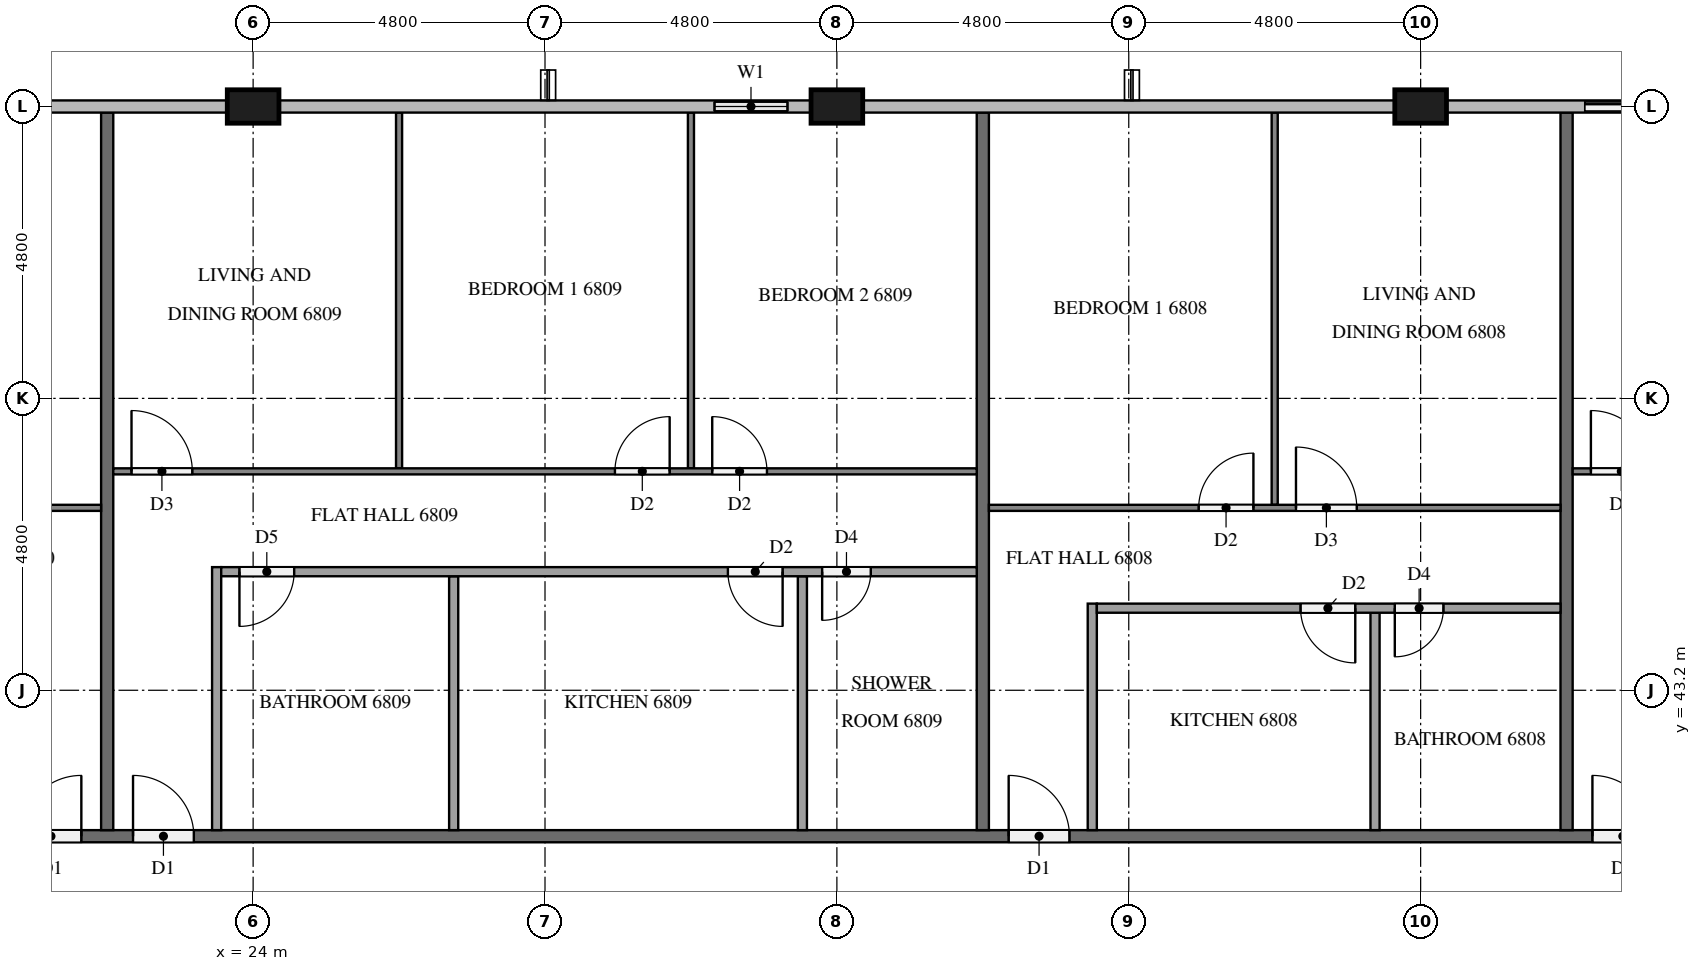
"""IFC4 building model, lengths in metres.
Left out: names, types, materials, properties, quantities, classifications, styles, units other than length and angle.
Written with IfcOpenShell. Run it as: python <this file> out.ifc"""

import sys

from ifc_helpers import new_model, si_unit, direction, frame, frame_2d, origin, origin_2d, place, context, subcontext, project, spatial, rectangle, extrude, element, fill, save


model = new_model("IFC4")
c1 = context("Model", 3, precision=1e-05, world=origin(), true_north=direction((0.0, 1.0)))
c2 = subcontext(c1, "Body", "Model", "MODEL_VIEW")
j1 = project(units=[si_unit("LENGTHUNIT", "METRE"), si_unit("PLANEANGLEUNIT", "RADIAN")], contexts=[c1])
p1 = place(None, origin())
s1 = spatial("IfcSite", under=j1, at=p1, CompositionType="ELEMENT")
p2 = place(p1, origin())
s2 = spatial("IfcBuilding", under=s1, at=p2, CompositionType="ELEMENT")
p3 = place(p2, frame((0.0, 0.0, 259.7)))
s3 = spatial("IfcBuildingStorey", under=s2, at=p3, CompositionType="ELEMENT", Elevation=259.7)
for number, where, z_axis, x_axis in (
    (1, (43.2, 52.8, 0.0), (0.0, 0.0, 1.0), (1.0, 0.0, 0.0)),
    (2, (33.6, 52.8, 0.0), (0.0, 0.0, 1.0), (1.0, 0.0, 0.0)),
    (3, (24.0, 52.8, 0.0), (0.0, 0.0, 1.0), (1.0, 0.0, 0.0)),
):
    element("IfcColumn", number, at=place(p3, frame(where, z_axis=z_axis, x_axis=x_axis)), inside=s3, PredefinedType="COLUMN", context=c2, shape_type="SweptSolid", body=[
        extrude(rectangle(XDim=0.85, YDim=0.55, at=origin_2d()), origin(), (0.0, 0.0, 1.0), 3.1),
    ])
p4 = place(p3, frame((48.0, 52.8, 0.0), z_axis=(0.0, 0.0, 1.0), x_axis=(-1.0, 0.0, 0.0)))
e4 = element("IfcWall", 4, at=p4, inside=s3, PredefinedType="SOLIDWALL", context=c2, shape_type="SweptSolid", body=[
    extrude(rectangle(XDim=2.4, YDim=0.15, at=frame_2d((1.2, 0.0))), origin(), (0.0, 0.0, 1.0), 3.1),
])
p5 = place(p4, frame((0.3, 0.0, 0.0)))
e5 = element("IfcOpeningElement", 5, at=p5, cuts=e4, PredefinedType="OPENING", context=c2, shape_type="SweptSolid", body=[
    extrude(rectangle(XDim=1.8, YDim=2.4, at=frame_2d((0.9, 1.2))), frame((0.0, 0.085, 0.0), z_axis=(0.0, -1.0, 0.0), x_axis=(1.0, 0.0, 0.0)), (0.0, 0.0, 1.0), 0.17),
])
p6 = place(p3, frame((33.175, 52.8, 0.0), z_axis=(0.0, 0.0, 1.0), x_axis=(-1.0, 0.0, 0.0)))
e6 = element("IfcWall", 6, at=p6, inside=s3, PredefinedType="SOLIDWALL", context=c2, shape_type="SweptSolid", body=[
    extrude(rectangle(XDim=1.975, YDim=0.15, at=frame_2d((0.988, 0.0))), origin(), (0.0, 0.0, 1.0), 3.1),
])
p7 = place(p6, frame((0.387, 0.0, 0.9)))
e7 = element("IfcOpeningElement", 7, at=p7, cuts=e6, PredefinedType="OPENING", context=c2, shape_type="SweptSolid", body=[
    extrude(rectangle(XDim=1.2, YDim=1.4, at=frame_2d((0.6, 0.7))), frame((0.0, 0.085, 0.0), z_axis=(0.0, -1.0, 0.0), x_axis=(1.0, 0.0, 0.0)), (0.0, 0.0, 1.0), 0.17),
])
p8 = place(p3, frame((11.9, 40.8, 0.0), z_axis=(0.0, 0.0, 1.0), x_axis=(1.0, 0.0, 0.0)))
e8 = element("IfcWall", 8, at=p8, inside=s3, PredefinedType="PARTITIONING", context=c2, shape_type="SweptSolid", body=[
    extrude(rectangle(XDim=38.6, YDim=0.2, at=frame_2d((19.3, 0.0))), origin(), (0.0, 0.0, 1.0), 3.1),
])
p9 = place(p8, frame((34.125, 0.0, 0.0)))
e9 = element("IfcOpeningElement", 9, at=p9, cuts=e8, PredefinedType="OPENING", context=c2, shape_type="SweptSolid", body=[
    extrude(rectangle(XDim=1.0, YDim=2.1, at=frame_2d((0.5, 1.05))), frame((0.0, 0.11, 0.0), z_axis=(0.0, -1.0, 0.0), x_axis=(1.0, 0.0, 0.0)), (0.0, 0.0, 1.0), 0.22),
])
p10 = place(p8, frame((24.525, 0.0, 0.0)))
e10 = element("IfcOpeningElement", 10, at=p10, cuts=e8, PredefinedType="OPENING", context=c2, shape_type="SweptSolid", body=[
    extrude(rectangle(XDim=1.0, YDim=2.1, at=frame_2d((0.5, 1.05))), frame((0.0, 0.11, 0.0), z_axis=(0.0, -1.0, 0.0), x_axis=(1.0, 0.0, 0.0)), (0.0, 0.0, 1.0), 0.22),
])
p11 = place(p8, frame((10.125, 0.0, 0.0)))
e11 = element("IfcOpeningElement", 11, at=p11, cuts=e8, PredefinedType="OPENING", context=c2, shape_type="SweptSolid", body=[
    extrude(rectangle(XDim=1.0, YDim=2.1, at=frame_2d((0.5, 1.05))), frame((0.0, 0.11, 0.0), z_axis=(0.0, -1.0, 0.0), x_axis=(1.0, 0.0, 0.0)), (0.0, 0.0, 1.0), 0.22),
])
p12 = place(p8, frame((8.275, 0.0, 0.0)))
e12 = element("IfcOpeningElement", 12, at=p12, cuts=e8, PredefinedType="OPENING", context=c2, shape_type="SweptSolid", body=[
    extrude(rectangle(XDim=1.0, YDim=2.1, at=frame_2d((0.5, 1.05))), frame((0.0, 0.11, 0.0), z_axis=(0.0, -1.0, 0.0), x_axis=(1.0, 0.0, 0.0)), (0.0, 0.0, 1.0), 0.22),
])
for number, where, z_axis, x_axis in (
    (13, (45.6, 52.7, 0.0), (0.0, 0.0, 1.0), (0.0, -1.0, 0.0)),
    (14, (36.0, 52.7, 0.0), (0.0, 0.0, 1.0), (0.0, -1.0, 0.0)),
    (15, (21.6, 52.7, 0.0), (0.0, 0.0, 1.0), (0.0, -1.0, 0.0)),
):
    element("IfcWall", number, at=place(p3, frame(where, z_axis=z_axis, x_axis=x_axis)), inside=s3, PredefinedType="PARTITIONING", context=c2, shape_type="SweptSolid", body=[
        extrude(rectangle(XDim=11.8, YDim=0.2, at=frame_2d((5.9, 0.0))), origin(), (0.0, 0.0, 1.0), 3.1),
    ])
p13 = place(p3, frame((45.7, 46.8, 0.0), z_axis=(0.0, 0.0, 1.0), x_axis=(1.0, 0.0, 0.0)))
e16 = element("IfcWall", 16, at=p13, inside=s3, PredefinedType="PARTITIONING", context=c2, shape_type="SweptSolid", body=[
    extrude(rectangle(XDim=11.8, YDim=0.1, at=frame_2d((5.9, 0.0))), origin(), (0.0, 0.0, 1.0), 3.1),
])
p14 = place(p13, frame((0.3, 0.0, 0.0)))
e17 = element("IfcOpeningElement", 17, at=p14, cuts=e16, PredefinedType="OPENING", context=c2, shape_type="SweptSolid", body=[
    extrude(rectangle(XDim=1.0, YDim=2.1, at=frame_2d((0.5, 1.05))), frame((0.0, 0.06, 0.0), z_axis=(0.0, -1.0, 0.0), x_axis=(1.0, 0.0, 0.0)), (0.0, 0.0, 1.0), 0.12),
])
p15 = place(p13, frame((10.6, 0.0, 0.0)))
e18 = element("IfcOpeningElement", 18, at=p15, cuts=e16, PredefinedType="OPENING", context=c2, shape_type="SweptSolid", body=[
    extrude(rectangle(XDim=0.9, YDim=2.1, at=frame_2d((0.45, 1.05))), frame((0.0, 0.06, 0.0), z_axis=(0.0, -1.0, 0.0), x_axis=(1.0, 0.0, 0.0)), (0.0, 0.0, 1.0), 0.12),
])
p16 = place(p3, frame((40.8, 46.25, 0.0), z_axis=(0.0, 0.0, 1.0), x_axis=(0.0, 1.0, 0.0)))
e19 = element("IfcWall", 19, at=p16, inside=s3, PredefinedType="PARTITIONING", context=c2, shape_type="SweptSolid", body=[
    extrude(rectangle(XDim=6.45, YDim=0.1, at=frame_2d((3.225, 0.0))), origin(), (0.0, 0.0, 1.0), 3.1),
])
p17 = place(p3, frame((36.1, 46.2, 0.0), z_axis=(0.0, 0.0, 1.0), x_axis=(1.0, 0.0, 0.0)))
e20 = element("IfcWall", 20, at=p17, inside=s3, PredefinedType="PARTITIONING", context=c2, shape_type="SweptSolid", body=[
    extrude(rectangle(XDim=9.4, YDim=0.1, at=frame_2d((4.7, 0.0))), origin(), (0.0, 0.0, 1.0), 3.1),
])
p18 = place(p17, frame((3.45, 0.0, 0.0)))
e21 = element("IfcOpeningElement", 21, at=p18, cuts=e20, PredefinedType="OPENING", context=c2, shape_type="SweptSolid", body=[
    extrude(rectangle(XDim=0.9, YDim=2.1, at=frame_2d((0.45, 1.05))), frame((0.0, 0.06, 0.0), z_axis=(0.0, -1.0, 0.0), x_axis=(1.0, 0.0, 0.0)), (0.0, 0.0, 1.0), 0.12),
])
p19 = place(p17, frame((5.05, 0.0, 0.0)))
e22 = element("IfcOpeningElement", 22, at=p19, cuts=e20, PredefinedType="OPENING", context=c2, shape_type="SweptSolid", body=[
    extrude(rectangle(XDim=1.0, YDim=2.1, at=frame_2d((0.5, 1.05))), frame((0.0, 0.06, 0.0), z_axis=(0.0, -1.0, 0.0), x_axis=(1.0, 0.0, 0.0)), (0.0, 0.0, 1.0), 0.12),
])
p20 = place(p3, frame((42.45, 40.9, 0.0), z_axis=(0.0, 0.0, 1.0), x_axis=(0.0, 1.0, 0.0)))
e23 = element("IfcWall", 23, at=p20, inside=s3, PredefinedType="PARTITIONING", context=c2, shape_type="SweptSolid", body=[
    extrude(rectangle(XDim=3.575, YDim=0.15, at=frame_2d((1.788, 0.0))), origin(), (0.0, 0.0, 1.0), 3.1),
])
p21 = place(p3, frame((37.8, 40.9, 0.0), z_axis=(0.0, 0.0, 1.0), x_axis=(0.0, 1.0, 0.0)))
e24 = element("IfcWall", 24, at=p21, inside=s3, PredefinedType="PARTITIONING", context=c2, shape_type="SweptSolid", body=[
    extrude(rectangle(XDim=3.725, YDim=0.15, at=frame_2d((1.863, 0.0))), origin(), (0.0, 0.0, 1.0), 3.1),
])
p22 = place(p3, frame((45.5, 44.55, 0.0), z_axis=(0.0, 0.0, 1.0), x_axis=(-1.0, 0.0, 0.0)))
e25 = element("IfcWall", 25, at=p22, inside=s3, PredefinedType="PARTITIONING", context=c2, shape_type="SweptSolid", body=[
    extrude(rectangle(XDim=7.625, YDim=0.15, at=frame_2d((3.812, 0.0))), origin(), (0.0, 0.0, 1.0), 3.1),
])
p23 = place(p22, frame((3.375, 0.0, 0.0)))
e26 = element("IfcOpeningElement", 26, at=p23, cuts=e25, PredefinedType="OPENING", context=c2, shape_type="SweptSolid", body=[
    extrude(rectangle(XDim=0.9, YDim=2.1, at=frame_2d((0.45, 1.05))), frame((0.0, 0.085, 0.0), z_axis=(0.0, -1.0, 0.0), x_axis=(1.0, 0.0, 0.0)), (0.0, 0.0, 1.0), 0.17),
])
p24 = place(p22, frame((1.925, 0.0, 0.0)))
e27 = element("IfcOpeningElement", 27, at=p24, cuts=e25, PredefinedType="OPENING", context=c2, shape_type="SweptSolid", body=[
    extrude(rectangle(XDim=0.8, YDim=2.1, at=frame_2d((0.4, 1.05))), frame((0.0, 0.085, 0.0), z_axis=(0.0, -1.0, 0.0), x_axis=(1.0, 0.0, 0.0)), (0.0, 0.0, 1.0), 0.17),
])
for number, where, z_axis, x_axis in (
    (28, (26.4, 46.85, 0.0), (0.0, 0.0, 1.0), (0.0, 1.0, 0.0)),
    (29, (31.2, 46.85, 0.0), (0.0, 0.0, 1.0), (0.0, 1.0, 0.0)),
):
    element("IfcWall", number, at=place(p3, frame(where, z_axis=z_axis, x_axis=x_axis)), inside=s3, PredefinedType="PARTITIONING", context=c2, shape_type="SweptSolid", body=[
        extrude(rectangle(XDim=5.85, YDim=0.1, at=frame_2d((2.925, 0.0))), origin(), (0.0, 0.0, 1.0), 3.1),
    ])
p25 = place(p3, frame((21.7, 46.8, 0.0), z_axis=(0.0, 0.0, 1.0), x_axis=(1.0, 0.0, 0.0)))
e30 = element("IfcWall", 30, at=p25, inside=s3, PredefinedType="PARTITIONING", context=c2, shape_type="SweptSolid", body=[
    extrude(rectangle(XDim=14.2, YDim=0.1, at=frame_2d((7.1, 0.0))), origin(), (0.0, 0.0, 1.0), 3.1),
])
p26 = place(p25, frame((0.3, 0.0, 0.0)))
e31 = element("IfcOpeningElement", 31, at=p26, cuts=e30, PredefinedType="OPENING", context=c2, shape_type="SweptSolid", body=[
    extrude(rectangle(XDim=1.0, YDim=2.1, at=frame_2d((0.5, 1.05))), frame((0.0, 0.06, 0.0), z_axis=(0.0, -1.0, 0.0), x_axis=(1.0, 0.0, 0.0)), (0.0, 0.0, 1.0), 0.12),
])
p27 = place(p25, frame((8.25, 0.0, 0.0)))
e32 = element("IfcOpeningElement", 32, at=p27, cuts=e30, PredefinedType="OPENING", context=c2, shape_type="SweptSolid", body=[
    extrude(rectangle(XDim=0.9, YDim=2.1, at=frame_2d((0.45, 1.05))), frame((0.0, 0.06, 0.0), z_axis=(0.0, -1.0, 0.0), x_axis=(1.0, 0.0, 0.0)), (0.0, 0.0, 1.0), 0.12),
])
p28 = place(p25, frame((9.85, 0.0, 0.0)))
e33 = element("IfcOpeningElement", 33, at=p28, cuts=e30, PredefinedType="OPENING", context=c2, shape_type="SweptSolid", body=[
    extrude(rectangle(XDim=0.9, YDim=2.1, at=frame_2d((0.45, 1.05))), frame((0.0, 0.06, 0.0), z_axis=(0.0, -1.0, 0.0), x_axis=(1.0, 0.0, 0.0)), (0.0, 0.0, 1.0), 0.12),
])
for number, where, z_axis, x_axis in (
    (34, (27.298, 40.9, 0.0), (0.0, 0.0, 1.0), (0.0, 1.0, 0.0)),
    (35, (33.033, 40.9, 0.0), (0.0, 0.0, 1.0), (0.0, 1.0, 0.0)),
):
    element("IfcWall", number, at=place(p3, frame(where, z_axis=z_axis, x_axis=x_axis)), inside=s3, PredefinedType="PARTITIONING", context=c2, shape_type="SweptSolid", body=[
        extrude(rectangle(XDim=4.175, YDim=0.15, at=frame_2d((2.087, 0.0))), origin(), (0.0, 0.0, 1.0), 3.1),
    ])
p29 = place(p3, frame((23.4, 40.9, 0.0), z_axis=(0.0, 0.0, 1.0), x_axis=(0.0, 1.0, 0.0)))
e36 = element("IfcWall", 36, at=p29, inside=s3, PredefinedType="PARTITIONING", context=c2, shape_type="SweptSolid", body=[
    extrude(rectangle(XDim=4.325, YDim=0.15, at=frame_2d((2.163, 0.0))), origin(), (0.0, 0.0, 1.0), 3.1),
])
p30 = place(p3, frame((35.9, 45.15, 0.0), z_axis=(0.0, 0.0, 1.0), x_axis=(-1.0, 0.0, 0.0)))
e37 = element("IfcWall", 37, at=p30, inside=s3, PredefinedType="PARTITIONING", context=c2, shape_type="SweptSolid", body=[
    extrude(rectangle(XDim=12.425, YDim=0.15, at=frame_2d((6.212, 0.0))), origin(), (0.0, 0.0, 1.0), 3.1),
])
p31 = place(p30, frame((11.225, 0.0, 0.0)))
e38 = element("IfcOpeningElement", 38, at=p31, cuts=e37, PredefinedType="OPENING", context=c2, shape_type="SweptSolid", body=[
    extrude(rectangle(XDim=0.9, YDim=2.1, at=frame_2d((0.45, 1.05))), frame((0.0, 0.085, 0.0), z_axis=(0.0, -1.0, 0.0), x_axis=(1.0, 0.0, 0.0)), (0.0, 0.0, 1.0), 0.17),
])
p32 = place(p30, frame((3.192, 0.0, 0.0)))
e39 = element("IfcOpeningElement", 39, at=p32, cuts=e37, PredefinedType="OPENING", context=c2, shape_type="SweptSolid", body=[
    extrude(rectangle(XDim=0.9, YDim=2.1, at=frame_2d((0.45, 1.05))), frame((0.0, 0.085, 0.0), z_axis=(0.0, -1.0, 0.0), x_axis=(1.0, 0.0, 0.0)), (0.0, 0.0, 1.0), 0.17),
])
p33 = place(p30, frame((1.742, 0.0, 0.0)))
e40 = element("IfcOpeningElement", 40, at=p33, cuts=e37, PredefinedType="OPENING", context=c2, shape_type="SweptSolid", body=[
    extrude(rectangle(XDim=0.8, YDim=2.1, at=frame_2d((0.4, 1.05))), frame((0.0, 0.085, 0.0), z_axis=(0.0, -1.0, 0.0), x_axis=(1.0, 0.0, 0.0)), (0.0, 0.0, 1.0), 0.17),
])
p34 = place(p3, frame((12.1, 46.2, 0.0), z_axis=(0.0, 0.0, 1.0), x_axis=(1.0, 0.0, 0.0)))
e41 = element("IfcWall", 41, at=p34, inside=s3, PredefinedType="PARTITIONING", context=c2, shape_type="SweptSolid", body=[
    extrude(rectangle(XDim=9.4, YDim=0.1, at=frame_2d((4.7, 0.0))), origin(), (0.0, 0.0, 1.0), 3.1),
])
p35 = place(p34, frame((5.05, 0.0, 0.0)))
e42 = element("IfcOpeningElement", 42, at=p35, cuts=e41, PredefinedType="OPENING", context=c2, shape_type="SweptSolid", body=[
    extrude(rectangle(XDim=1.0, YDim=2.1, at=frame_2d((0.5, 1.05))), frame((0.0, 0.06, 0.0), z_axis=(0.0, -1.0, 0.0), x_axis=(1.0, 0.0, 0.0)), (0.0, 0.0, 1.0), 0.12),
])
p36 = place(p34, frame((3.45, 0.0, 0.0)))
e43 = element("IfcOpeningElement", 43, at=p36, cuts=e41, PredefinedType="OPENING", context=c2, shape_type="SweptSolid", body=[
    extrude(rectangle(XDim=0.9, YDim=2.1, at=frame_2d((0.45, 1.05))), frame((0.0, 0.06, 0.0), z_axis=(0.0, -1.0, 0.0), x_axis=(1.0, 0.0, 0.0)), (0.0, 0.0, 1.0), 0.12),
])
p37 = place(p5, origin())
e44 = element("IfcDoor", 44, at=p37, inside=s3, OperationType="SLIDING_TO_LEFT", PredefinedType="DOOR", context=c2, shape_type="SweptSolid", body=[
    extrude(rectangle(XDim=1.8, YDim=2.4, at=frame_2d((0.9, 1.2))), frame((0.0, 0.025, 0.0), z_axis=(0.0, -1.0, 0.0), x_axis=(1.0, 0.0, 0.0)), (0.0, 0.0, 1.0), 0.05),
])
fill(e5, e44)
p38 = place(p7, origin())
e45 = element("IfcWindow", 45, at=p38, inside=s3, PartitioningType="SINGLE_PANEL", PredefinedType="WINDOW", context=c2, shape_type="SweptSolid", body=[
    extrude(rectangle(XDim=1.2, YDim=1.4, at=frame_2d((0.6, 0.7))), frame((0.0, 0.03, 0.0), z_axis=(0.0, -1.0, 0.0), x_axis=(1.0, 0.0, 0.0)), (0.0, 0.0, 1.0), 0.06),
])
fill(e7, e45)
p39 = place(p9, origin())
e46 = element("IfcDoor", 46, at=p39, inside=s3, OperationType="SINGLE_SWING_LEFT", PredefinedType="DOOR", context=c2, shape_type="SweptSolid", body=[
    extrude(rectangle(XDim=1.0, YDim=2.1, at=frame_2d((0.5, 1.05))), frame((0.0, 0.025, 0.0), z_axis=(0.0, -1.0, 0.0), x_axis=(1.0, 0.0, 0.0)), (0.0, 0.0, 1.0), 0.05),
])
fill(e9, e46)
p40 = place(p10, origin())
e47 = element("IfcDoor", 47, at=p40, inside=s3, OperationType="SINGLE_SWING_LEFT", PredefinedType="DOOR", context=c2, shape_type="SweptSolid", body=[
    extrude(rectangle(XDim=1.0, YDim=2.1, at=frame_2d((0.5, 1.05))), frame((0.0, 0.025, 0.0), z_axis=(0.0, -1.0, 0.0), x_axis=(1.0, 0.0, 0.0)), (0.0, 0.0, 1.0), 0.05),
])
fill(e10, e47)
p41 = place(p11, origin())
e48 = element("IfcDoor", 48, at=p41, inside=s3, OperationType="SINGLE_SWING_LEFT", PredefinedType="DOOR", context=c2, shape_type="SweptSolid", body=[
    extrude(rectangle(XDim=1.0, YDim=2.1, at=frame_2d((0.5, 1.05))), frame((0.0, 0.025, 0.0), z_axis=(0.0, -1.0, 0.0), x_axis=(1.0, 0.0, 0.0)), (0.0, 0.0, 1.0), 0.05),
])
fill(e11, e48)
p42 = place(p12, origin())
e49 = element("IfcDoor", 49, at=p42, inside=s3, OperationType="SINGLE_SWING_RIGHT", PredefinedType="DOOR", context=c2, shape_type="SweptSolid", body=[
    extrude(rectangle(XDim=1.0, YDim=2.1, at=frame_2d((0.5, 1.05))), frame((0.0, 0.025, 0.0), z_axis=(0.0, -1.0, 0.0), x_axis=(1.0, 0.0, 0.0)), (0.0, 0.0, 1.0), 0.05),
])
fill(e12, e49)
p43 = place(p14, origin())
e50 = element("IfcDoor", 50, at=p43, inside=s3, OperationType="SINGLE_SWING_LEFT", PredefinedType="DOOR", context=c2, shape_type="SweptSolid", body=[
    extrude(rectangle(XDim=1.0, YDim=2.1, at=frame_2d((0.5, 1.05))), frame((0.0, 0.025, 0.0), z_axis=(0.0, -1.0, 0.0), x_axis=(1.0, 0.0, 0.0)), (0.0, 0.0, 1.0), 0.05),
])
fill(e17, e50)
p44 = place(p18, origin())
e51 = element("IfcDoor", 51, at=p44, inside=s3, OperationType="SINGLE_SWING_RIGHT", PredefinedType="DOOR", context=c2, shape_type="SweptSolid", body=[
    extrude(rectangle(XDim=0.9, YDim=2.1, at=frame_2d((0.45, 1.05))), frame((0.0, 0.025, 0.0), z_axis=(0.0, -1.0, 0.0), x_axis=(1.0, 0.0, 0.0)), (0.0, 0.0, 1.0), 0.05),
])
fill(e21, e51)
p45 = place(p19, origin())
e52 = element("IfcDoor", 52, at=p45, inside=s3, OperationType="SINGLE_SWING_LEFT", PredefinedType="DOOR", context=c2, shape_type="SweptSolid", body=[
    extrude(rectangle(XDim=1.0, YDim=2.1, at=frame_2d((0.5, 1.05))), frame((0.0, 0.025, 0.0), z_axis=(0.0, -1.0, 0.0), x_axis=(1.0, 0.0, 0.0)), (0.0, 0.0, 1.0), 0.05),
])
fill(e22, e52)
p46 = place(p23, origin())
e53 = element("IfcDoor", 53, at=p46, inside=s3, OperationType="SINGLE_SWING_LEFT", PredefinedType="DOOR", context=c2, shape_type="SweptSolid", body=[
    extrude(rectangle(XDim=0.9, YDim=2.1, at=frame_2d((0.45, 1.05))), frame((0.0, 0.025, 0.0), z_axis=(0.0, -1.0, 0.0), x_axis=(1.0, 0.0, 0.0)), (0.0, 0.0, 1.0), 0.05),
])
fill(e26, e53)
p47 = place(p24, origin())
e54 = element("IfcDoor", 54, at=p47, inside=s3, OperationType="SINGLE_SWING_RIGHT", PredefinedType="DOOR", context=c2, shape_type="SweptSolid", body=[
    extrude(rectangle(XDim=0.8, YDim=2.1, at=frame_2d((0.4, 1.05))), frame((0.0, 0.025, 0.0), z_axis=(0.0, -1.0, 0.0), x_axis=(1.0, 0.0, 0.0)), (0.0, 0.0, 1.0), 0.05),
])
fill(e27, e54)
p48 = place(p26, origin())
e55 = element("IfcDoor", 55, at=p48, inside=s3, OperationType="SINGLE_SWING_LEFT", PredefinedType="DOOR", context=c2, shape_type="SweptSolid", body=[
    extrude(rectangle(XDim=1.0, YDim=2.1, at=frame_2d((0.5, 1.05))), frame((0.0, 0.025, 0.0), z_axis=(0.0, -1.0, 0.0), x_axis=(1.0, 0.0, 0.0)), (0.0, 0.0, 1.0), 0.05),
])
fill(e31, e55)
p49 = place(p27, origin())
e56 = element("IfcDoor", 56, at=p49, inside=s3, OperationType="SINGLE_SWING_RIGHT", PredefinedType="DOOR", context=c2, shape_type="SweptSolid", body=[
    extrude(rectangle(XDim=0.9, YDim=2.1, at=frame_2d((0.45, 1.05))), frame((0.0, 0.025, 0.0), z_axis=(0.0, -1.0, 0.0), x_axis=(1.0, 0.0, 0.0)), (0.0, 0.0, 1.0), 0.05),
])
fill(e32, e56)
p50 = place(p28, origin())
e57 = element("IfcDoor", 57, at=p50, inside=s3, OperationType="SINGLE_SWING_LEFT", PredefinedType="DOOR", context=c2, shape_type="SweptSolid", body=[
    extrude(rectangle(XDim=0.9, YDim=2.1, at=frame_2d((0.45, 1.05))), frame((0.0, 0.025, 0.0), z_axis=(0.0, -1.0, 0.0), x_axis=(1.0, 0.0, 0.0)), (0.0, 0.0, 1.0), 0.05),
])
fill(e33, e57)
p51 = place(p31, origin())
e58 = element("IfcDoor", 58, at=p51, inside=s3, OperationType="SINGLE_SWING_RIGHT", PredefinedType="DOOR", context=c2, shape_type="SweptSolid", body=[
    extrude(rectangle(XDim=0.9, YDim=2.1, at=frame_2d((0.45, 1.05))), frame((0.0, 0.025, 0.0), z_axis=(0.0, -1.0, 0.0), x_axis=(1.0, 0.0, 0.0)), (0.0, 0.0, 1.0), 0.05),
])
fill(e38, e58)
p52 = place(p32, origin())
e59 = element("IfcDoor", 59, at=p52, inside=s3, OperationType="SINGLE_SWING_LEFT", PredefinedType="DOOR", context=c2, shape_type="SweptSolid", body=[
    extrude(rectangle(XDim=0.9, YDim=2.1, at=frame_2d((0.45, 1.05))), frame((0.0, 0.025, 0.0), z_axis=(0.0, -1.0, 0.0), x_axis=(1.0, 0.0, 0.0)), (0.0, 0.0, 1.0), 0.05),
])
fill(e39, e59)
p53 = place(p33, origin())
e60 = element("IfcDoor", 60, at=p53, inside=s3, OperationType="SINGLE_SWING_RIGHT", PredefinedType="DOOR", context=c2, shape_type="SweptSolid", body=[
    extrude(rectangle(XDim=0.8, YDim=2.1, at=frame_2d((0.4, 1.05))), frame((0.0, 0.025, 0.0), z_axis=(0.0, -1.0, 0.0), x_axis=(1.0, 0.0, 0.0)), (0.0, 0.0, 1.0), 0.05),
])
fill(e40, e60)
save(model, sys.argv[1])
